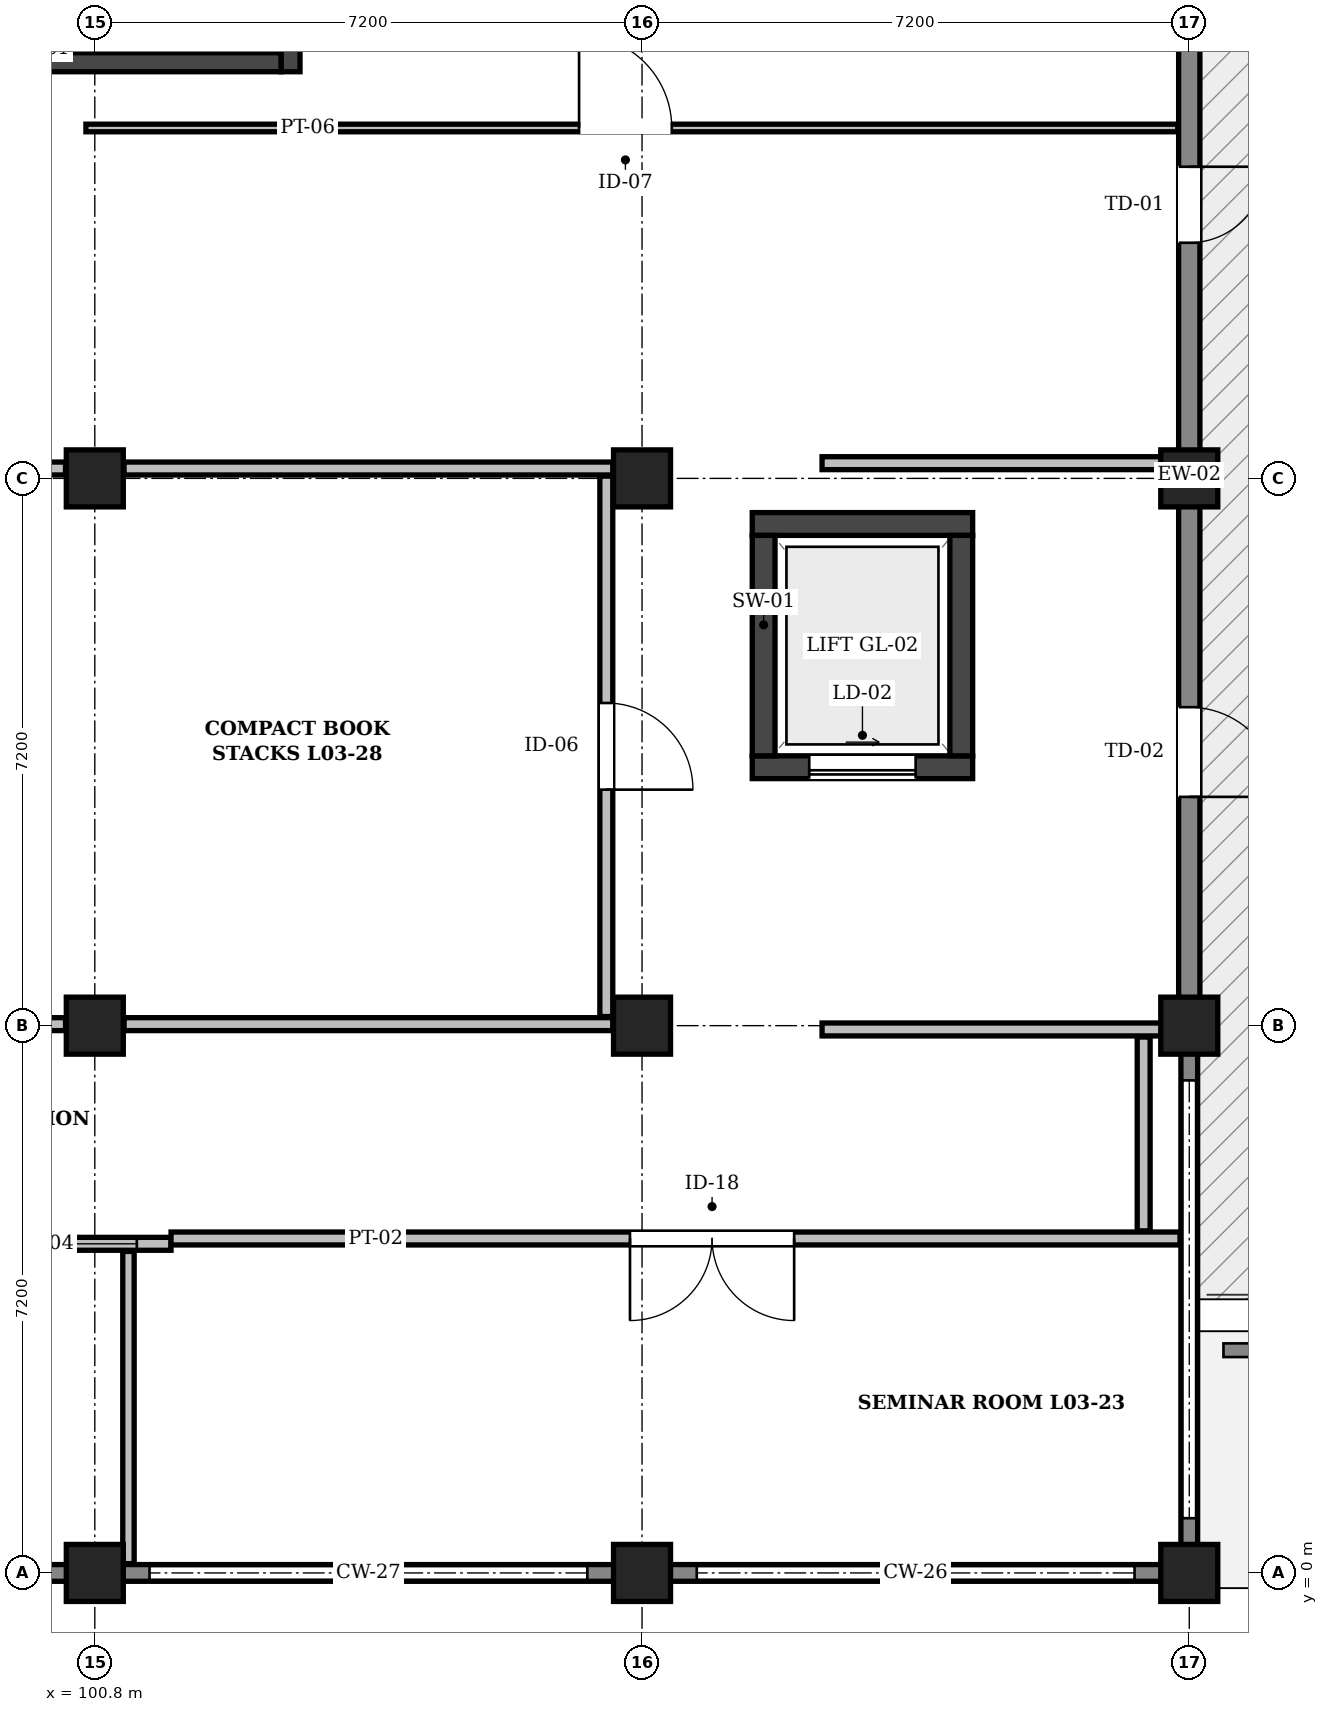
"""IFC4 building model, lengths in metres.
Left out: names, types, materials, properties, quantities, classifications, styles, units other than length and angle.
Written with IfcOpenShell. Run it as: python <this file> out.ifc"""

import sys

from ifc_helpers import new_model, si_unit, direction, frame, frame_2d, origin, origin_2d, place, context, subcontext, project, spatial, rectangle, extrude, element, fill, save


model = new_model("IFC4")
c1 = context("Model", 3, precision=1e-05, world=origin(), true_north=direction((0.0, 1.0)))
c2 = subcontext(c1, "Body", "Model", "MODEL_VIEW")
j1 = project(units=[si_unit("LENGTHUNIT", "METRE"), si_unit("PLANEANGLEUNIT", "RADIAN")], contexts=[c1])
p1 = place(None, origin())
s1 = spatial("IfcSite", under=j1, at=p1, CompositionType="ELEMENT")
p2 = place(p1, origin())
s2 = spatial("IfcBuilding", under=s1, at=p2, CompositionType="ELEMENT")
p3 = place(p2, frame((0.0, 0.0, 14.4)))
s3 = spatial("IfcBuildingStorey", under=s2, at=p3, CompositionType="ELEMENT", Elevation=14.4)
for number, where, z_axis, x_axis in (
    (1, (100.8, 0.0, 0.0), (0.0, 0.0, 1.0), (1.0, 0.0, 0.0)),
    (2, (100.8, 7.2, 0.0), (0.0, 0.0, 1.0), (1.0, 0.0, 0.0)),
    (3, (100.8, 14.4, 0.0), (0.0, 0.0, 1.0), (1.0, 0.0, 0.0)),
    (4, (108.0, 0.0, 0.0), (0.0, 0.0, 1.0), (1.0, 0.0, 0.0)),
    (5, (108.0, 7.2, 0.0), (0.0, 0.0, 1.0), (1.0, 0.0, 0.0)),
    (6, (108.0, 14.4, 0.0), (0.0, 0.0, 1.0), (1.0, 0.0, 0.0)),
    (7, (115.2, 0.0, 0.0), (0.0, 0.0, 1.0), (1.0, 0.0, 0.0)),
    (8, (115.2, 7.2, 0.0), (0.0, 0.0, 1.0), (1.0, 0.0, 0.0)),
    (9, (115.2, 14.4, 0.0), (0.0, 0.0, 1.0), (1.0, 0.0, 0.0)),
):
    element("IfcColumn", number, at=place(p3, frame(where, z_axis=z_axis, x_axis=x_axis)), inside=s3, PredefinedType="COLUMN", context=c2, shape_type="SweptSolid", body=[
        extrude(rectangle(XDim=0.75, YDim=0.75, at=origin_2d()), origin(), (0.0, 0.0, 1.0), 4.5),
    ])
p4 = place(p3, frame((115.35, 0.0, 0.0), z_axis=(0.0, 0.0, 1.0), x_axis=(-1.0, 0.0, 0.0)))
e10 = element("IfcWall", 10, at=p4, inside=s3, PredefinedType="SOLIDWALL", context=c2, shape_type="SweptSolid", body=[
    extrude(rectangle(XDim=7.35, YDim=0.22, at=frame_2d((3.675, 0.0))), origin(), (0.0, 0.0, 1.0), 1.24),
])
for number, where, z_axis, x_axis in (
    (11, (108.0, 0.0, 0.0), (0.0, 0.0, 1.0), (-1.0, 0.0, 0.0)),
    (12, (100.8, 0.0, 0.0), (0.0, 0.0, 1.0), (-1.0, 0.0, 0.0)),
):
    element("IfcWall", number, at=place(p3, frame(where, z_axis=z_axis, x_axis=x_axis)), inside=s3, PredefinedType="SOLIDWALL", context=c2, shape_type="SweptSolid", body=[
        extrude(rectangle(XDim=7.2, YDim=0.22, at=frame_2d((3.6, 0.0))), origin(), (0.0, 0.0, 1.0), 1.24),
    ])
p5 = place(p3, frame((115.2, 21.6, 0.0), z_axis=(0.0, 0.0, 1.0), x_axis=(0.0, -1.0, 0.0)))
e13 = element("IfcWall", 13, at=p5, inside=s3, PredefinedType="SOLIDWALL", context=c2, shape_type="SweptSolid", body=[
    extrude(rectangle(XDim=7.2, YDim=0.28, at=frame_2d((3.6, 0.0))), origin(), (0.0, 0.0, 1.0), 4.22),
])
p6 = place(p5, frame((3.1, 0.0, 0.0)))
e14 = element("IfcOpeningElement", 14, at=p6, cuts=e13, PredefinedType="OPENING", context=c2, shape_type="SweptSolid", body=[
    extrude(rectangle(XDim=1.0, YDim=2.15, at=frame_2d((0.5, 1.075))), frame((0.0, 0.152, 0.0), z_axis=(0.0, -1.0, 0.0), x_axis=(1.0, 0.0, 0.0)), (0.0, 0.0, 1.0), 0.304),
])
p7 = place(p3, frame((115.2, 14.4, 0.0), z_axis=(0.0, 0.0, 1.0), x_axis=(0.0, -1.0, 0.0)))
e15 = element("IfcWall", 15, at=p7, inside=s3, PredefinedType="SOLIDWALL", context=c2, shape_type="SweptSolid", body=[
    extrude(rectangle(XDim=7.2, YDim=0.28, at=frame_2d((3.6, 0.0))), origin(), (0.0, 0.0, 1.0), 4.22),
])
p8 = place(p7, frame((3.01, 0.0, 0.0)))
e16 = element("IfcOpeningElement", 16, at=p8, cuts=e15, PredefinedType="OPENING", context=c2, shape_type="SweptSolid", body=[
    extrude(rectangle(XDim=1.18, YDim=2.18, at=frame_2d((0.59, 1.09))), frame((0.0, 0.152, 0.0), z_axis=(0.0, -1.0, 0.0), x_axis=(1.0, 0.0, 0.0)), (0.0, 0.0, 1.0), 0.304),
])
p9 = place(p3, frame((115.2, 7.2, 0.0), z_axis=(0.0, 0.0, 1.0), x_axis=(0.0, -1.0, 0.0)))
e17 = element("IfcWall", 17, at=p9, inside=s3, PredefinedType="SOLIDWALL", context=c2, shape_type="SweptSolid", body=[
    extrude(rectangle(XDim=7.048, YDim=0.22, at=frame_2d((3.524, 0.0))), origin(), (0.0, 0.0, 1.0), 1.24),
])
p10 = place(p3, frame((115.65, 2.93, 0.0), z_axis=(0.0, 0.0, 1.0), x_axis=(1.0, 0.0, 0.0)))
e18 = element("IfcWall", 18, at=p10, inside=s3, PredefinedType="PARAPET", context=c2, shape_type="SweptSolid", body=[
    extrude(rectangle(XDim=13.7, YDim=0.18, at=frame_2d((6.85, 0.0))), origin(), (0.0, 0.0, 1.0), 0.95),
])
p11 = place(p3, frame((109.45, 10.6, 0.0), z_axis=(0.0, 0.0, 1.0), x_axis=(1.0, 0.0, 0.0)))
e19 = element("IfcWall", 19, at=p11, inside=s3, PredefinedType="SHEAR", context=c2, shape_type="SweptSolid", body=[
    extrude(rectangle(XDim=2.9, YDim=0.3, at=frame_2d((1.45, 0.0))), origin(), (0.0, 0.0, 1.0), 4.25),
])
p12 = place(p11, frame((0.75, 0.0, 0.0)))
e20 = element("IfcOpeningElement", 20, at=p12, cuts=e19, PredefinedType="OPENING", context=c2, shape_type="SweptSolid", body=[
    extrude(rectangle(XDim=1.4, YDim=2.2, at=frame_2d((0.7, 1.1))), frame((0.0, 0.162, 0.0), z_axis=(0.0, -1.0, 0.0), x_axis=(1.0, 0.0, 0.0)), (0.0, 0.0, 1.0), 0.324),
])
p13 = place(p3, frame((109.45, 13.8, 0.0), z_axis=(0.0, 0.0, 1.0), x_axis=(1.0, 0.0, 0.0)))
e21 = element("IfcWall", 21, at=p13, inside=s3, PredefinedType="SHEAR", context=c2, shape_type="SweptSolid", body=[
    extrude(rectangle(XDim=2.9, YDim=0.3, at=frame_2d((1.45, 0.0))), origin(), (0.0, 0.0, 1.0), 4.25),
])
for number, where, z_axis, x_axis in (
    (22, (109.6, 10.75, 0.0), (0.0, 0.0, 1.0), (0.0, 1.0, 0.0)),
    (23, (112.2, 10.75, 0.0), (0.0, 0.0, 1.0), (0.0, 1.0, 0.0)),
):
    element("IfcWall", number, at=place(p3, frame(where, z_axis=z_axis, x_axis=x_axis)), inside=s3, PredefinedType="SHEAR", context=c2, shape_type="SweptSolid", body=[
        extrude(rectangle(XDim=2.9, YDim=0.3, at=frame_2d((1.45, 0.0))), origin(), (0.0, 0.0, 1.0), 4.25),
    ])
p14 = place(p3, frame((103.375, 19.75, 0.0), z_axis=(0.0, 0.0, 1.0), x_axis=(0.0, 1.0, 0.0)))
e24 = element("IfcWall", 24, at=p14, inside=s3, PredefinedType="SHEAR", context=c2, shape_type="SweptSolid", body=[
    extrude(rectangle(XDim=3.7, YDim=0.25, at=frame_2d((1.85, 0.0))), origin(), (0.0, 0.0, 1.0), 4.25),
])
p15 = place(p3, frame((95.65, 19.875, 0.0), z_axis=(0.0, 0.0, 1.0), x_axis=(1.0, 0.0, 0.0)))
e25 = element("IfcWall", 25, at=p15, inside=s3, PredefinedType="SHEAR", context=c2, shape_type="SweptSolid", body=[
    extrude(rectangle(XDim=7.6, YDim=0.25, at=frame_2d((3.8, 0.0))), origin(), (0.0, 0.0, 1.0), 4.25),
])
p16 = place(p3, frame((110.368, 14.6, 0.0), z_axis=(0.0, 0.0, 1.0), x_axis=(1.0, 0.0, 0.0)))
e26 = element("IfcWall", 26, at=p16, inside=s3, PredefinedType="PARTITIONING", context=c2, shape_type="SweptSolid", body=[
    extrude(rectangle(XDim=4.68, YDim=0.17, at=frame_2d((2.34, 0.0))), origin(), (0.0, 0.0, 1.0), 2.78),
])
for number, where, z_axis, x_axis in (
    (27, (93.985, 14.53, 0.0), (0.0, 0.0, 1.0), (1.0, 0.0, 0.0)),
    (28, (101.185, 14.53, 0.0), (0.0, 0.0, 1.0), (1.0, 0.0, 0.0)),
):
    element("IfcWall", number, at=place(p3, frame(where, z_axis=z_axis, x_axis=x_axis)), inside=s3, PredefinedType="PARTITIONING", context=c2, shape_type="SweptSolid", body=[
        extrude(rectangle(XDim=6.43, YDim=0.17, at=frame_2d((3.215, 0.0))), origin(), (0.0, 0.0, 1.0), 3.7),
    ])
p17 = place(p3, frame((87.466, 4.33, 0.0), z_axis=(0.0, 0.0, 1.0), x_axis=(1.0, 0.0, 0.0)))
e29 = element("IfcWall", 29, at=p17, inside=s3, PredefinedType="PARTITIONING", context=c2, shape_type="SweptSolid", body=[
    extrude(rectangle(XDim=14.337, YDim=0.17, at=frame_2d((7.168, 0.0))), origin(), (0.0, 0.0, 1.0), 4.16),
])
p18 = place(p17, frame((6.208, 0.0, 0.0)))
e30 = element("IfcOpeningElement", 30, at=p18, cuts=e29, PredefinedType="OPENING", context=c2, shape_type="SweptSolid", body=[
    extrude(rectangle(XDim=1.92, YDim=2.32, at=frame_2d((0.96, 1.16))), frame((0.0, 0.097, 0.0), z_axis=(0.0, -1.0, 0.0), x_axis=(1.0, 0.0, 0.0)), (0.0, 0.0, 1.0), 0.194),
])
p19 = place(p17, frame((11.487, 0.0, 1.05)))
e31 = element("IfcOpeningElement", 31, at=p19, cuts=e29, PredefinedType="OPENING", context=c2, shape_type="SweptSolid", body=[
    extrude(rectangle(XDim=2.4, YDim=1.15, at=frame_2d((1.2, 0.575))), frame((0.0, 0.097, 0.0), z_axis=(0.0, -1.0, 0.0), x_axis=(1.0, 0.0, 0.0)), (0.0, 0.0, 1.0), 0.194),
])
p20 = place(p3, frame((101.803, 4.4, 0.0), z_axis=(0.0, 0.0, 1.0), x_axis=(1.0, 0.0, 0.0)))
e32 = element("IfcWall", 32, at=p20, inside=s3, PredefinedType="PARTITIONING", context=c2, shape_type="SweptSolid", body=[
    extrude(rectangle(XDim=13.275, YDim=0.17, at=frame_2d((6.637, 0.0))), origin(), (0.0, 0.0, 1.0), 4.16),
])
p21 = place(p20, frame((6.039, 0.0, 0.0)))
e33 = element("IfcOpeningElement", 33, at=p21, cuts=e32, PredefinedType="OPENING", context=c2, shape_type="SweptSolid", body=[
    extrude(rectangle(XDim=2.16, YDim=2.35, at=frame_2d((1.08, 1.175))), frame((0.0, 0.097, 0.0), z_axis=(0.0, -1.0, 0.0), x_axis=(1.0, 0.0, 0.0)), (0.0, 0.0, 1.0), 0.194),
])
p22 = place(p3, frame((110.368, 7.15, 0.0), z_axis=(0.0, 0.0, 1.0), x_axis=(1.0, 0.0, 0.0)))
e34 = element("IfcWall", 34, at=p22, inside=s3, PredefinedType="PARTITIONING", context=c2, shape_type="SweptSolid", body=[
    extrude(rectangle(XDim=4.709, YDim=0.17, at=frame_2d((2.355, 0.0))), origin(), (0.0, 0.0, 1.0), 2.78),
])
p23 = place(p3, frame((114.6, 4.5, 0.0), z_axis=(0.0, 0.0, 1.0), x_axis=(0.0, 1.0, 0.0)))
e35 = element("IfcWall", 35, at=p23, inside=s3, PredefinedType="PARTITIONING", context=c2, shape_type="SweptSolid", body=[
    extrude(rectangle(XDim=2.55, YDim=0.17, at=frame_2d((1.275, 0.0))), origin(), (0.0, 0.0, 1.0), 4.16),
])
for number, where, z_axis, x_axis in (
    (36, (93.985, 7.22, 0.0), (0.0, 0.0, 1.0), (1.0, 0.0, 0.0)),
    (37, (101.185, 7.22, 0.0), (0.0, 0.0, 1.0), (1.0, 0.0, 0.0)),
):
    element("IfcWall", number, at=place(p3, frame(where, z_axis=z_axis, x_axis=x_axis)), inside=s3, PredefinedType="PARTITIONING", context=c2, shape_type="SweptSolid", body=[
        extrude(rectangle(XDim=6.43, YDim=0.17, at=frame_2d((3.215, 0.0))), origin(), (0.0, 0.0, 1.0), 3.7),
    ])
p24 = place(p3, frame((107.53, 7.32, 0.0), z_axis=(0.0, 0.0, 1.0), x_axis=(0.0, 1.0, 0.0)))
e38 = element("IfcWall", 38, at=p24, inside=s3, PredefinedType="PARTITIONING", context=c2, shape_type="SweptSolid", body=[
    extrude(rectangle(XDim=7.11, YDim=0.17, at=frame_2d((3.555, 0.0))), origin(), (0.0, 0.0, 1.0), 4.16),
])
p25 = place(p24, frame((2.985, 0.0, 0.0)))
e39 = element("IfcOpeningElement", 39, at=p25, cuts=e38, PredefinedType="OPENING", context=c2, shape_type="SweptSolid", body=[
    extrude(rectangle(XDim=1.14, YDim=2.2, at=frame_2d((0.57, 1.1))), frame((0.0, 0.097, 0.0), z_axis=(0.0, -1.0, 0.0), x_axis=(1.0, 0.0, 0.0)), (0.0, 0.0, 1.0), 0.194),
])
p26 = place(p3, frame((101.243, 0.122, 0.0), z_axis=(0.0, 0.0, 1.0), x_axis=(0.0, 1.0, 0.0)))
e40 = element("IfcWall", 40, at=p26, inside=s3, PredefinedType="PARTITIONING", context=c2, shape_type="SweptSolid", body=[
    extrude(rectangle(XDim=4.108, YDim=0.15, at=frame_2d((2.054, 0.0))), origin(), (0.0, 0.0, 1.0), 4.16),
])
p27 = place(p3, frame((100.683, 19.01, 0.0), z_axis=(0.0, 0.0, 1.0), x_axis=(1.0, 0.0, 0.0)))
e41 = element("IfcWall", 41, at=p27, inside=s3, PredefinedType="PARTITIONING", context=c2, shape_type="SweptSolid", body=[
    extrude(rectangle(XDim=14.365, YDim=0.1, at=frame_2d((7.183, 0.0))), origin(), (0.0, 0.0, 1.0), 4.16),
])
p28 = place(p27, frame((6.489, 0.0, 0.0)))
e42 = element("IfcOpeningElement", 42, at=p28, cuts=e41, PredefinedType="OPENING", context=c2, shape_type="SweptSolid", body=[
    extrude(rectangle(XDim=1.22, YDim=2.22, at=frame_2d((0.61, 1.11))), frame((0.0, 0.062, 0.0), z_axis=(0.0, -1.0, 0.0), x_axis=(1.0, 0.0, 0.0)), (0.0, 0.0, 1.0), 0.124),
])
p29 = place(p6, origin())
e43 = element("IfcDoor", 43, at=p29, inside=s3, OperationType="SINGLE_SWING_LEFT", PredefinedType="DOOR", context=c2, shape_type="SweptSolid", body=[
    extrude(rectangle(XDim=1.0, YDim=2.15, at=frame_2d((0.5, 1.075))), frame((0.0, 0.025, 0.0), z_axis=(0.0, -1.0, 0.0), x_axis=(1.0, 0.0, 0.0)), (0.0, 0.0, 1.0), 0.05),
])
fill(e14, e43)
p30 = place(p8, origin())
e44 = element("IfcDoor", 44, at=p30, inside=s3, OperationType="SINGLE_SWING_RIGHT", PredefinedType="DOOR", context=c2, shape_type="SweptSolid", body=[
    extrude(rectangle(XDim=1.18, YDim=2.18, at=frame_2d((0.59, 1.09))), frame((0.0, 0.025, 0.0), z_axis=(0.0, -1.0, 0.0), x_axis=(1.0, 0.0, 0.0)), (0.0, 0.0, 1.0), 0.05),
])
fill(e16, e44)
p31 = place(p12, frame((1.4, 0.0, 0.0), z_axis=(0.0, 0.0, 1.0), x_axis=(-1.0, 0.0, 0.0)))
e45 = element("IfcDoor", 45, at=p31, inside=s3, OperationType="SLIDING_TO_RIGHT", PredefinedType="DOOR", context=c2, shape_type="SweptSolid", body=[
    extrude(rectangle(XDim=1.4, YDim=2.2, at=frame_2d((0.7, 1.1))), frame((0.0, 0.025, 0.0), z_axis=(0.0, -1.0, 0.0), x_axis=(1.0, 0.0, 0.0)), (0.0, 0.0, 1.0), 0.05),
])
fill(e20, e45)
p32 = place(p19, origin())
e46 = element("IfcWindow", 46, at=p32, inside=s3, PartitioningType="SINGLE_PANEL", PredefinedType="WINDOW", context=c2, shape_type="SweptSolid", body=[
    extrude(rectangle(XDim=2.4, YDim=1.15, at=frame_2d((1.2, 0.575))), frame((0.0, 0.03, 0.0), z_axis=(0.0, -1.0, 0.0), x_axis=(1.0, 0.0, 0.0)), (0.0, 0.0, 1.0), 0.06),
])
fill(e31, e46)
p33 = place(p21, frame((2.16, 0.0, 0.0), z_axis=(0.0, 0.0, 1.0), x_axis=(-1.0, 0.0, 0.0)))
e47 = element("IfcDoor", 47, at=p33, inside=s3, OperationType="DOUBLE_DOOR_SINGLE_SWING", PredefinedType="DOOR", context=c2, shape_type="SweptSolid", body=[
    extrude(rectangle(XDim=2.16, YDim=2.35, at=frame_2d((1.08, 1.175))), frame((0.0, 0.025, 0.0), z_axis=(0.0, -1.0, 0.0), x_axis=(1.0, 0.0, 0.0)), (0.0, 0.0, 1.0), 0.05),
])
fill(e33, e47)
p34 = place(p25, frame((1.14, 0.0, 0.0), z_axis=(0.0, 0.0, 1.0), x_axis=(-1.0, 0.0, 0.0)))
e48 = element("IfcDoor", 48, at=p34, inside=s3, OperationType="SINGLE_SWING_RIGHT", PredefinedType="DOOR", context=c2, shape_type="SweptSolid", body=[
    extrude(rectangle(XDim=1.14, YDim=2.2, at=frame_2d((0.57, 1.1))), frame((0.0, 0.025, 0.0), z_axis=(0.0, -1.0, 0.0), x_axis=(1.0, 0.0, 0.0)), (0.0, 0.0, 1.0), 0.05),
])
fill(e39, e48)
p35 = place(p28, origin())
e49 = element("IfcDoor", 49, at=p35, inside=s3, OperationType="SINGLE_SWING_LEFT", PredefinedType="DOOR", context=c2, shape_type="SweptSolid", body=[
    extrude(rectangle(XDim=1.22, YDim=2.22, at=frame_2d((0.61, 1.11))), frame((0.0, 0.025, 0.0), z_axis=(0.0, -1.0, 0.0), x_axis=(1.0, 0.0, 0.0)), (0.0, 0.0, 1.0), 0.05),
])
fill(e42, e49)
save(model, sys.argv[1])
